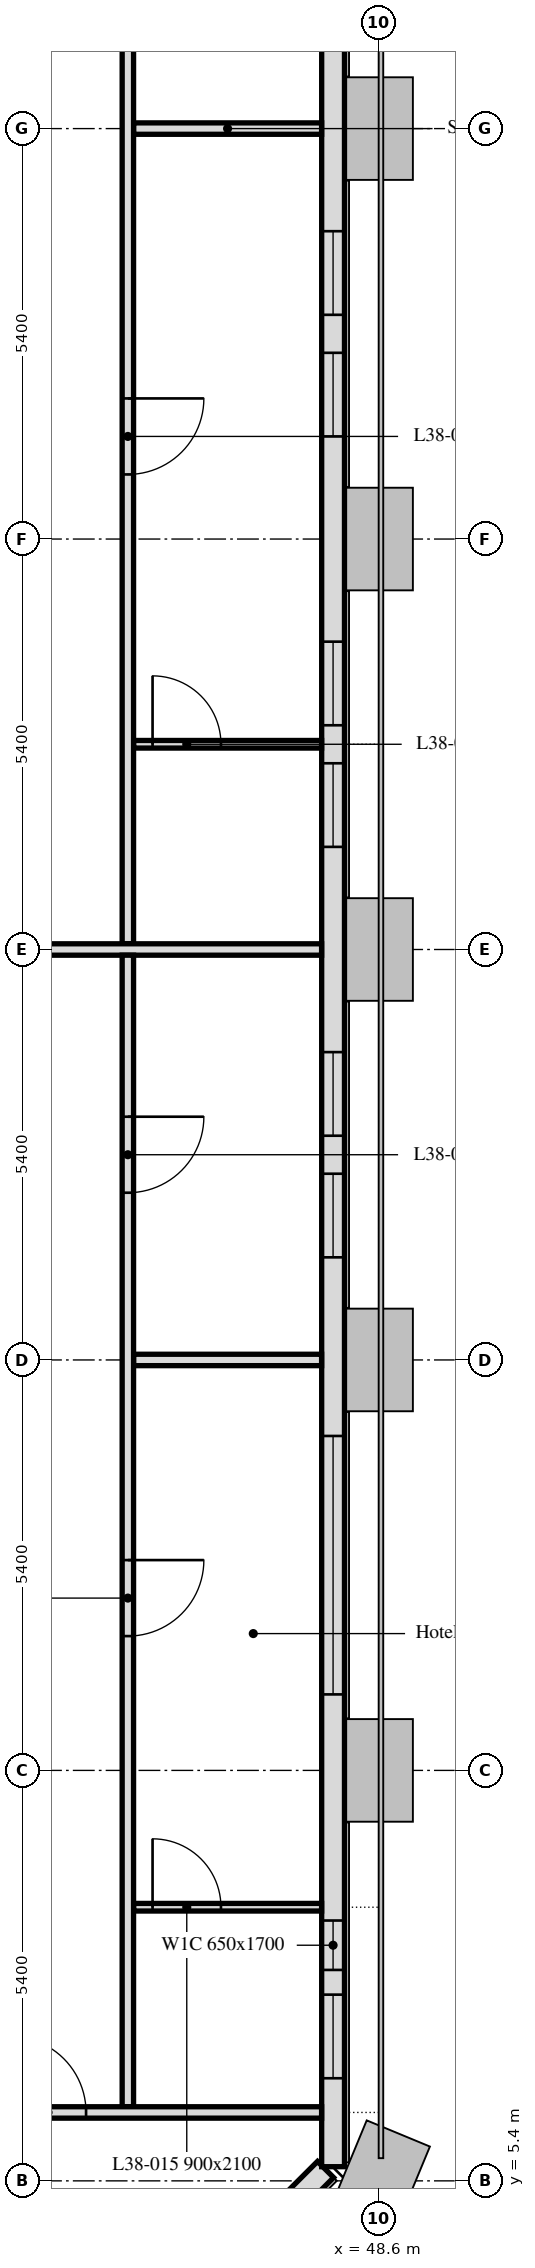
"""IFC4 building model, lengths in metres.
Left out: names, types, materials, properties, quantities, classifications, styles, units other than length and angle.
Written with IfcOpenShell. Run it as: python <this file> out.ifc"""

import sys

from ifc_helpers import new_model, si_unit, direction, frame, frame_2d, origin, place, context, subcontext, project, spatial, rectangle, extrude, element, fill, save


model = new_model("IFC4")
c1 = context("Model", 3, precision=1e-05, world=origin(), true_north=direction((0.0, 1.0)))
c2 = subcontext(c1, "Body", "Model", "MODEL_VIEW")
j1 = project(units=[si_unit("LENGTHUNIT", "METRE"), si_unit("PLANEANGLEUNIT", "RADIAN")], contexts=[c1])
p1 = place(None, origin())
s1 = spatial("IfcSite", under=j1, at=p1, CompositionType="ELEMENT")
p2 = place(p1, origin())
s2 = spatial("IfcBuilding", under=s1, at=p2, CompositionType="ELEMENT")
p3 = place(p2, frame((0.0, 0.0, 162.7)))
s3 = spatial("IfcBuildingStorey", under=s2, at=p3, CompositionType="ELEMENT", Elevation=162.7)
p4 = place(p3, frame((43.051, 0.699, 0.0), z_axis=(0.0, 0.0, 1.0), x_axis=(0.707106781187, 0.707106781187, 0.0)))
e1 = element("IfcWall", 1, at=p4, inside=s3, PredefinedType="SOLIDWALL", context=c2, shape_type="SweptSolid", body=[
    extrude(rectangle(XDim=6.86, YDim=0.3, at=frame_2d((3.43, 0.0))), origin(), (0.0, 0.0, 1.0), 3.0),
])
p5 = place(p4, frame((1.28, 0.0, 0.9)))
e2 = element("IfcOpeningElement", 2, at=p5, cuts=e1, PredefinedType="OPENING", context=c2, shape_type="SweptSolid", body=[
    extrude(rectangle(XDim=1.1, YDim=1.7, at=frame_2d((0.55, 0.85))), frame((0.0, 0.16, 0.0), z_axis=(0.0, -1.0, 0.0), x_axis=(1.0, 0.0, 0.0)), (0.0, 0.0, 1.0), 0.32),
])
p6 = place(p4, frame((4.48, 0.0, 0.9)))
e3 = element("IfcOpeningElement", 3, at=p6, cuts=e1, PredefinedType="OPENING", context=c2, shape_type="SweptSolid", body=[
    extrude(rectangle(XDim=1.1, YDim=1.7, at=frame_2d((0.55, 0.85))), frame((0.0, 0.16, 0.0), z_axis=(0.0, -1.0, 0.0), x_axis=(1.0, 0.0, 0.0)), (0.0, 0.0, 1.0), 0.32),
])
p7 = place(p3, frame((48.0, 5.586, 0.0), z_axis=(0.0, 0.0, 1.0), x_axis=(0.0, 1.0, 0.0)))
e4 = element("IfcWall", 4, at=p7, inside=s3, PredefinedType="SOLIDWALL", context=c2, shape_type="SweptSolid", body=[
    extrude(rectangle(XDim=32.027, YDim=0.3, at=frame_2d((16.014, 0.0))), origin(), (0.0, 0.0, 1.0), 3.0),
])
p8 = place(p7, frame((1.164, 0.0, 0.9)))
e5 = element("IfcOpeningElement", 5, at=p8, cuts=e4, PredefinedType="OPENING", context=c2, shape_type="SweptSolid", body=[
    extrude(rectangle(XDim=1.1, YDim=1.7, at=frame_2d((0.55, 0.85))), frame((0.0, 0.16, 0.0), z_axis=(0.0, -1.0, 0.0), x_axis=(1.0, 0.0, 0.0)), (0.0, 0.0, 1.0), 0.32),
])
p9 = place(p7, frame((2.589, 0.0, 0.9)))
e6 = element("IfcOpeningElement", 6, at=p9, cuts=e4, PredefinedType="OPENING", context=c2, shape_type="SweptSolid", body=[
    extrude(rectangle(XDim=0.65, YDim=1.7, at=frame_2d((0.325, 0.85))), frame((0.0, 0.16, 0.0), z_axis=(0.0, -1.0, 0.0), x_axis=(1.0, 0.0, 0.0)), (0.0, 0.0, 1.0), 0.32),
])
p10 = place(p7, frame((6.214, 0.0, 0.9)))
e7 = element("IfcOpeningElement", 7, at=p10, cuts=e4, PredefinedType="OPENING", context=c2, shape_type="SweptSolid", body=[
    extrude(rectangle(XDim=3.4, YDim=1.7, at=frame_2d((1.7, 0.85))), frame((0.0, 0.16, 0.0), z_axis=(0.0, -1.0, 0.0), x_axis=(1.0, 0.0, 0.0)), (0.0, 0.0, 1.0), 0.32),
])
p11 = place(p7, frame((11.964, 0.0, 0.9)))
e8 = element("IfcOpeningElement", 8, at=p11, cuts=e4, PredefinedType="OPENING", context=c2, shape_type="SweptSolid", body=[
    extrude(rectangle(XDim=1.1, YDim=1.7, at=frame_2d((0.55, 0.85))), frame((0.0, 0.16, 0.0), z_axis=(0.0, -1.0, 0.0), x_axis=(1.0, 0.0, 0.0)), (0.0, 0.0, 1.0), 0.32),
])
p12 = place(p7, frame((13.564, 0.0, 0.9)))
e9 = element("IfcOpeningElement", 9, at=p12, cuts=e4, PredefinedType="OPENING", context=c2, shape_type="SweptSolid", body=[
    extrude(rectangle(XDim=1.1, YDim=1.7, at=frame_2d((0.55, 0.85))), frame((0.0, 0.16, 0.0), z_axis=(0.0, -1.0, 0.0), x_axis=(1.0, 0.0, 0.0)), (0.0, 0.0, 1.0), 0.32),
])
p13 = place(p7, frame((17.364, 0.0, 0.9)))
e10 = element("IfcOpeningElement", 10, at=p13, cuts=e4, PredefinedType="OPENING", context=c2, shape_type="SweptSolid", body=[
    extrude(rectangle(XDim=1.1, YDim=1.7, at=frame_2d((0.55, 0.85))), frame((0.0, 0.16, 0.0), z_axis=(0.0, -1.0, 0.0), x_axis=(1.0, 0.0, 0.0)), (0.0, 0.0, 1.0), 0.32),
])
p14 = place(p7, frame((18.964, 0.0, 0.9)))
e11 = element("IfcOpeningElement", 11, at=p14, cuts=e4, PredefinedType="OPENING", context=c2, shape_type="SweptSolid", body=[
    extrude(rectangle(XDim=1.1, YDim=1.7, at=frame_2d((0.55, 0.85))), frame((0.0, 0.16, 0.0), z_axis=(0.0, -1.0, 0.0), x_axis=(1.0, 0.0, 0.0)), (0.0, 0.0, 1.0), 0.32),
])
p15 = place(p7, frame((22.764, 0.0, 0.9)))
e12 = element("IfcOpeningElement", 12, at=p15, cuts=e4, PredefinedType="OPENING", context=c2, shape_type="SweptSolid", body=[
    extrude(rectangle(XDim=1.1, YDim=1.7, at=frame_2d((0.55, 0.85))), frame((0.0, 0.16, 0.0), z_axis=(0.0, -1.0, 0.0), x_axis=(1.0, 0.0, 0.0)), (0.0, 0.0, 1.0), 0.32),
])
p16 = place(p7, frame((24.364, 0.0, 0.9)))
e13 = element("IfcOpeningElement", 13, at=p16, cuts=e4, PredefinedType="OPENING", context=c2, shape_type="SweptSolid", body=[
    extrude(rectangle(XDim=1.1, YDim=1.7, at=frame_2d((0.55, 0.85))), frame((0.0, 0.16, 0.0), z_axis=(0.0, -1.0, 0.0), x_axis=(1.0, 0.0, 0.0)), (0.0, 0.0, 1.0), 0.32),
])
p17 = place(p7, frame((28.164, 0.0, 0.9)))
e14 = element("IfcOpeningElement", 14, at=p17, cuts=e4, PredefinedType="OPENING", context=c2, shape_type="SweptSolid", body=[
    extrude(rectangle(XDim=1.1, YDim=1.7, at=frame_2d((0.55, 0.85))), frame((0.0, 0.16, 0.0), z_axis=(0.0, -1.0, 0.0), x_axis=(1.0, 0.0, 0.0)), (0.0, 0.0, 1.0), 0.32),
])
p18 = place(p7, frame((29.764, 0.0, 0.9)))
e15 = element("IfcOpeningElement", 15, at=p18, cuts=e4, PredefinedType="OPENING", context=c2, shape_type="SweptSolid", body=[
    extrude(rectangle(XDim=1.1, YDim=1.7, at=frame_2d((0.55, 0.85))), frame((0.0, 0.16, 0.0), z_axis=(0.0, -1.0, 0.0), x_axis=(1.0, 0.0, 0.0)), (0.0, 0.0, 1.0), 0.32),
])
p19 = place(p3, frame((45.375, 32.4, 0.0), z_axis=(0.0, 0.0, 1.0), x_axis=(1.0, 0.0, 0.0)))
e16 = element("IfcWall", 16, at=p19, inside=s3, PredefinedType="PARTITIONING", context=c2, shape_type="SweptSolid", body=[
    extrude(rectangle(XDim=2.474, YDim=0.15, at=frame_2d((1.237, 0.0))), origin(), (0.0, 0.0, 1.0), 2.4),
])
p20 = place(p3, frame((45.375, 24.3, 0.0), z_axis=(0.0, 0.0, 1.0), x_axis=(1.0, 0.0, 0.0)))
e17 = element("IfcWall", 17, at=p20, inside=s3, PredefinedType="PARTITIONING", context=c2, shape_type="SweptSolid", body=[
    extrude(rectangle(XDim=2.474, YDim=0.1, at=frame_2d((1.237, 0.0))), origin(), (0.0, 0.0, 1.0), 3.0),
])
p21 = place(p20, frame((0.25, 0.0, 0.0)))
e18 = element("IfcOpeningElement", 18, at=p21, cuts=e17, PredefinedType="OPENING", context=c2, shape_type="SweptSolid", body=[
    extrude(rectangle(XDim=0.9, YDim=2.1, at=frame_2d((0.45, 1.05))), frame((0.0, 0.05, 0.0), z_axis=(0.0, -1.0, 0.0), x_axis=(1.0, 0.0, 0.0)), (0.0, 0.0, 1.0), 0.1),
])
p22 = place(p3, frame((45.3, 36.825, 0.0), z_axis=(0.0, 0.0, 1.0), x_axis=(0.0, -1.0, 0.0)))
e19 = element("IfcWall", 19, at=p22, inside=s3, PredefinedType="PARTITIONING", context=c2, shape_type="SweptSolid", body=[
    extrude(rectangle(XDim=15.15, YDim=0.15, at=frame_2d((7.575, 0.0))), origin(), (0.0, 0.0, 1.0), 2.4),
])
p23 = place(p22, frame((1.675, 0.0, 0.0)))
e20 = element("IfcOpeningElement", 20, at=p23, cuts=e19, PredefinedType="OPENING", context=c2, shape_type="SweptSolid", body=[
    extrude(rectangle(XDim=1.0, YDim=2.1, at=frame_2d((0.5, 1.05))), frame((0.0, 0.075, 0.0), z_axis=(0.0, -1.0, 0.0), x_axis=(1.0, 0.0, 0.0)), (0.0, 0.0, 1.0), 0.15),
])
p24 = place(p22, frame((7.975, 0.0, 0.0)))
e21 = element("IfcOpeningElement", 21, at=p24, cuts=e19, PredefinedType="OPENING", context=c2, shape_type="SweptSolid", body=[
    extrude(rectangle(XDim=1.0, YDim=2.1, at=frame_2d((0.5, 1.05))), frame((0.0, 0.075, 0.0), z_axis=(0.0, -1.0, 0.0), x_axis=(1.0, 0.0, 0.0)), (0.0, 0.0, 1.0), 0.15),
])
p25 = place(p3, frame((43.2, 21.6, 0.0), z_axis=(0.0, 0.0, 1.0), x_axis=(1.0, 0.0, 0.0)))
e22 = element("IfcWall", 22, at=p25, inside=s3, PredefinedType="PARTITIONING", context=c2, shape_type="SweptSolid", body=[
    extrude(rectangle(XDim=4.649, YDim=0.15, at=frame_2d((2.325, 0.0))), origin(), (0.0, 0.0, 1.0), 2.4),
])
p26 = place(p3, frame((47.849, 16.2, 0.0), z_axis=(0.0, 0.0, 1.0), x_axis=(-1.0, 0.0, 0.0)))
e23 = element("IfcWall", 23, at=p26, inside=s3, PredefinedType="PARTITIONING", context=c2, shape_type="SweptSolid", body=[
    extrude(rectangle(XDim=2.474, YDim=0.15, at=frame_2d((1.237, 0.0))), origin(), (0.0, 0.0, 1.0), 2.4),
])
p27 = place(p3, frame((45.375, 9.0, 0.0), z_axis=(0.0, 0.0, 1.0), x_axis=(1.0, 0.0, 0.0)))
e24 = element("IfcWall", 24, at=p27, inside=s3, PredefinedType="PARTITIONING", context=c2, shape_type="SweptSolid", body=[
    extrude(rectangle(XDim=2.474, YDim=0.1, at=frame_2d((1.237, 0.0))), origin(), (0.0, 0.0, 1.0), 3.0),
])
p28 = place(p27, frame((0.25, 0.0, 0.0)))
e25 = element("IfcOpeningElement", 25, at=p28, cuts=e24, PredefinedType="OPENING", context=c2, shape_type="SweptSolid", body=[
    extrude(rectangle(XDim=0.9, YDim=2.1, at=frame_2d((0.45, 1.05))), frame((0.0, 0.05, 0.0), z_axis=(0.0, -1.0, 0.0), x_axis=(1.0, 0.0, 0.0)), (0.0, 0.0, 1.0), 0.1),
])
p29 = place(p3, frame((45.3, 21.525, 0.0), z_axis=(0.0, 0.0, 1.0), x_axis=(0.0, -1.0, 0.0)))
e26 = element("IfcWall", 26, at=p29, inside=s3, PredefinedType="PARTITIONING", context=c2, shape_type="SweptSolid", body=[
    extrude(rectangle(XDim=15.15, YDim=0.15, at=frame_2d((7.575, 0.0))), origin(), (0.0, 0.0, 1.0), 2.4),
])
p30 = place(p29, frame((2.125, 0.0, 0.0)))
e27 = element("IfcOpeningElement", 27, at=p30, cuts=e26, PredefinedType="OPENING", context=c2, shape_type="SweptSolid", body=[
    extrude(rectangle(XDim=1.0, YDim=2.1, at=frame_2d((0.5, 1.05))), frame((0.0, 0.075, 0.0), z_axis=(0.0, -1.0, 0.0), x_axis=(1.0, 0.0, 0.0)), (0.0, 0.0, 1.0), 0.15),
])
p31 = place(p29, frame((7.958, 0.0, 0.0)))
e28 = element("IfcOpeningElement", 28, at=p31, cuts=e26, PredefinedType="OPENING", context=c2, shape_type="SweptSolid", body=[
    extrude(rectangle(XDim=1.0, YDim=2.1, at=frame_2d((0.5, 1.05))), frame((0.0, 0.075, 0.0), z_axis=(0.0, -1.0, 0.0), x_axis=(1.0, 0.0, 0.0)), (0.0, 0.0, 1.0), 0.15),
])
p32 = place(p3, frame((6.151, 6.3, 0.0), z_axis=(0.0, 0.0, 1.0), x_axis=(1.0, 0.0, 0.0)))
e29 = element("IfcWall", 29, at=p32, inside=s3, PredefinedType="PARTITIONING", context=c2, shape_type="SweptSolid", body=[
    extrude(rectangle(XDim=41.698, YDim=0.15, at=frame_2d((20.849, 0.0))), origin(), (0.0, 0.0, 1.0), 2.4),
])
p33 = place(p32, frame((1.132, 0.0, 0.0)))
e30 = element("IfcOpeningElement", 30, at=p33, cuts=e29, PredefinedType="OPENING", context=c2, shape_type="SweptSolid", body=[
    extrude(rectangle(XDim=1.0, YDim=2.1, at=frame_2d((0.5, 1.05))), frame((0.0, 0.075, 0.0), z_axis=(0.0, -1.0, 0.0), x_axis=(1.0, 0.0, 0.0)), (0.0, 0.0, 1.0), 0.15),
])
p34 = place(p32, frame((13.049, 0.0, 0.0)))
e31 = element("IfcOpeningElement", 31, at=p34, cuts=e29, PredefinedType="OPENING", context=c2, shape_type="SweptSolid", body=[
    extrude(rectangle(XDim=1.0, YDim=2.1, at=frame_2d((0.5, 1.05))), frame((0.0, 0.075, 0.0), z_axis=(0.0, -1.0, 0.0), x_axis=(1.0, 0.0, 0.0)), (0.0, 0.0, 1.0), 0.15),
])
p35 = place(p32, frame((17.649, 0.0, 0.0)))
e32 = element("IfcOpeningElement", 32, at=p35, cuts=e29, PredefinedType="OPENING", context=c2, shape_type="SweptSolid", body=[
    extrude(rectangle(XDim=1.0, YDim=2.1, at=frame_2d((0.5, 1.05))), frame((0.0, 0.075, 0.0), z_axis=(0.0, -1.0, 0.0), x_axis=(1.0, 0.0, 0.0)), (0.0, 0.0, 1.0), 0.15),
])
p36 = place(p32, frame((29.249, 0.0, 0.0)))
e33 = element("IfcOpeningElement", 33, at=p36, cuts=e29, PredefinedType="OPENING", context=c2, shape_type="SweptSolid", body=[
    extrude(rectangle(XDim=1.0, YDim=2.1, at=frame_2d((0.5, 1.05))), frame((0.0, 0.075, 0.0), z_axis=(0.0, -1.0, 0.0), x_axis=(1.0, 0.0, 0.0)), (0.0, 0.0, 1.0), 0.15),
])
p37 = place(p32, frame((37.599, 0.0, 0.0)))
e34 = element("IfcOpeningElement", 34, at=p37, cuts=e29, PredefinedType="OPENING", context=c2, shape_type="SweptSolid", body=[
    extrude(rectangle(XDim=1.0, YDim=2.1, at=frame_2d((0.5, 1.05))), frame((0.0, 0.075, 0.0), z_axis=(0.0, -1.0, 0.0), x_axis=(1.0, 0.0, 0.0)), (0.0, 0.0, 1.0), 0.15),
])
p38 = place(p8, origin())
e35 = element("IfcWindow", 35, at=p38, inside=s3, PartitioningType="SINGLE_PANEL", PredefinedType="WINDOW", context=c2, shape_type="SweptSolid", body=[
    extrude(rectangle(XDim=1.1, YDim=1.7, at=frame_2d((0.55, 0.85))), frame((0.0, 0.03, 0.0), z_axis=(0.0, -1.0, 0.0), x_axis=(1.0, 0.0, 0.0)), (0.0, 0.0, 1.0), 0.06),
])
fill(e5, e35)
p39 = place(p9, origin())
e36 = element("IfcWindow", 36, at=p39, inside=s3, PartitioningType="SINGLE_PANEL", PredefinedType="WINDOW", context=c2, shape_type="SweptSolid", body=[
    extrude(rectangle(XDim=0.65, YDim=1.7, at=frame_2d((0.325, 0.85))), frame((0.0, 0.03, 0.0), z_axis=(0.0, -1.0, 0.0), x_axis=(1.0, 0.0, 0.0)), (0.0, 0.0, 1.0), 0.06),
])
fill(e6, e36)
p40 = place(p10, origin())
e37 = element("IfcWindow", 37, at=p40, inside=s3, PartitioningType="SINGLE_PANEL", PredefinedType="WINDOW", context=c2, shape_type="SweptSolid", body=[
    extrude(rectangle(XDim=3.4, YDim=1.7, at=frame_2d((1.7, 0.85))), frame((0.0, 0.03, 0.0), z_axis=(0.0, -1.0, 0.0), x_axis=(1.0, 0.0, 0.0)), (0.0, 0.0, 1.0), 0.06),
])
fill(e7, e37)
p41 = place(p11, origin())
e38 = element("IfcWindow", 38, at=p41, inside=s3, PartitioningType="SINGLE_PANEL", PredefinedType="WINDOW", context=c2, shape_type="SweptSolid", body=[
    extrude(rectangle(XDim=1.1, YDim=1.7, at=frame_2d((0.55, 0.85))), frame((0.0, 0.03, 0.0), z_axis=(0.0, -1.0, 0.0), x_axis=(1.0, 0.0, 0.0)), (0.0, 0.0, 1.0), 0.06),
])
fill(e8, e38)
p42 = place(p12, origin())
e39 = element("IfcWindow", 39, at=p42, inside=s3, PartitioningType="SINGLE_PANEL", PredefinedType="WINDOW", context=c2, shape_type="SweptSolid", body=[
    extrude(rectangle(XDim=1.1, YDim=1.7, at=frame_2d((0.55, 0.85))), frame((0.0, 0.03, 0.0), z_axis=(0.0, -1.0, 0.0), x_axis=(1.0, 0.0, 0.0)), (0.0, 0.0, 1.0), 0.06),
])
fill(e9, e39)
p43 = place(p13, origin())
e40 = element("IfcWindow", 40, at=p43, inside=s3, PartitioningType="SINGLE_PANEL", PredefinedType="WINDOW", context=c2, shape_type="SweptSolid", body=[
    extrude(rectangle(XDim=1.1, YDim=1.7, at=frame_2d((0.55, 0.85))), frame((0.0, 0.03, 0.0), z_axis=(0.0, -1.0, 0.0), x_axis=(1.0, 0.0, 0.0)), (0.0, 0.0, 1.0), 0.06),
])
fill(e10, e40)
p44 = place(p14, origin())
e41 = element("IfcWindow", 41, at=p44, inside=s3, PartitioningType="SINGLE_PANEL", PredefinedType="WINDOW", context=c2, shape_type="SweptSolid", body=[
    extrude(rectangle(XDim=1.1, YDim=1.7, at=frame_2d((0.55, 0.85))), frame((0.0, 0.03, 0.0), z_axis=(0.0, -1.0, 0.0), x_axis=(1.0, 0.0, 0.0)), (0.0, 0.0, 1.0), 0.06),
])
fill(e11, e41)
p45 = place(p15, origin())
e42 = element("IfcWindow", 42, at=p45, inside=s3, PartitioningType="SINGLE_PANEL", PredefinedType="WINDOW", context=c2, shape_type="SweptSolid", body=[
    extrude(rectangle(XDim=1.1, YDim=1.7, at=frame_2d((0.55, 0.85))), frame((0.0, 0.03, 0.0), z_axis=(0.0, -1.0, 0.0), x_axis=(1.0, 0.0, 0.0)), (0.0, 0.0, 1.0), 0.06),
])
fill(e12, e42)
p46 = place(p16, origin())
e43 = element("IfcWindow", 43, at=p46, inside=s3, PartitioningType="SINGLE_PANEL", PredefinedType="WINDOW", context=c2, shape_type="SweptSolid", body=[
    extrude(rectangle(XDim=1.1, YDim=1.7, at=frame_2d((0.55, 0.85))), frame((0.0, 0.03, 0.0), z_axis=(0.0, -1.0, 0.0), x_axis=(1.0, 0.0, 0.0)), (0.0, 0.0, 1.0), 0.06),
])
fill(e13, e43)
p47 = place(p21, origin())
e44 = element("IfcDoor", 44, at=p47, inside=s3, OperationType="SINGLE_SWING_LEFT", PredefinedType="DOOR", context=c2, shape_type="SweptSolid", body=[
    extrude(rectangle(XDim=0.9, YDim=2.1, at=frame_2d((0.45, 1.05))), frame((0.0, 0.025, 0.0), z_axis=(0.0, -1.0, 0.0), x_axis=(1.0, 0.0, 0.0)), (0.0, 0.0, 1.0), 0.05),
])
fill(e18, e44)
p48 = place(p28, origin())
e45 = element("IfcDoor", 45, at=p48, inside=s3, OperationType="SINGLE_SWING_RIGHT", PredefinedType="DOOR", context=c2, shape_type="SweptSolid", body=[
    extrude(rectangle(XDim=0.9, YDim=2.1, at=frame_2d((0.45, 1.05))), frame((0.0, 0.025, 0.0), z_axis=(0.0, -1.0, 0.0), x_axis=(1.0, 0.0, 0.0)), (0.0, 0.0, 1.0), 0.05),
])
fill(e25, e45)
p49 = place(p30, origin())
e46 = element("IfcDoor", 46, at=p49, inside=s3, OperationType="SINGLE_SWING_RIGHT", PredefinedType="DOOR", context=c2, shape_type="SweptSolid", body=[
    extrude(rectangle(XDim=1.0, YDim=2.1, at=frame_2d((0.5, 1.05))), frame((0.0, 0.025, 0.0), z_axis=(0.0, -1.0, 0.0), x_axis=(1.0, 0.0, 0.0)), (0.0, 0.0, 1.0), 0.05),
])
fill(e27, e46)
p50 = place(p24, origin())
e47 = element("IfcDoor", 47, at=p50, inside=s3, OperationType="SINGLE_SWING_LEFT", PredefinedType="DOOR", context=c2, shape_type="SweptSolid", body=[
    extrude(rectangle(XDim=1.0, YDim=2.1, at=frame_2d((0.5, 1.05))), frame((0.0, 0.025, 0.0), z_axis=(0.0, -1.0, 0.0), x_axis=(1.0, 0.0, 0.0)), (0.0, 0.0, 1.0), 0.05),
])
fill(e21, e47)
p51 = place(p31, origin())
e48 = element("IfcDoor", 48, at=p51, inside=s3, OperationType="SINGLE_SWING_LEFT", PredefinedType="DOOR", context=c2, shape_type="SweptSolid", body=[
    extrude(rectangle(XDim=1.0, YDim=2.1, at=frame_2d((0.5, 1.05))), frame((0.0, 0.025, 0.0), z_axis=(0.0, -1.0, 0.0), x_axis=(1.0, 0.0, 0.0)), (0.0, 0.0, 1.0), 0.05),
])
fill(e28, e48)
p52 = place(p37, origin())
e49 = element("IfcDoor", 49, at=p52, inside=s3, OperationType="SINGLE_SWING_RIGHT", PredefinedType="DOOR", context=c2, shape_type="SweptSolid", body=[
    extrude(rectangle(XDim=1.0, YDim=2.1, at=frame_2d((0.5, 1.05))), frame((0.0, 0.025, 0.0), z_axis=(0.0, -1.0, 0.0), x_axis=(1.0, 0.0, 0.0)), (0.0, 0.0, 1.0), 0.05),
])
fill(e34, e49)
save(model, sys.argv[1])
